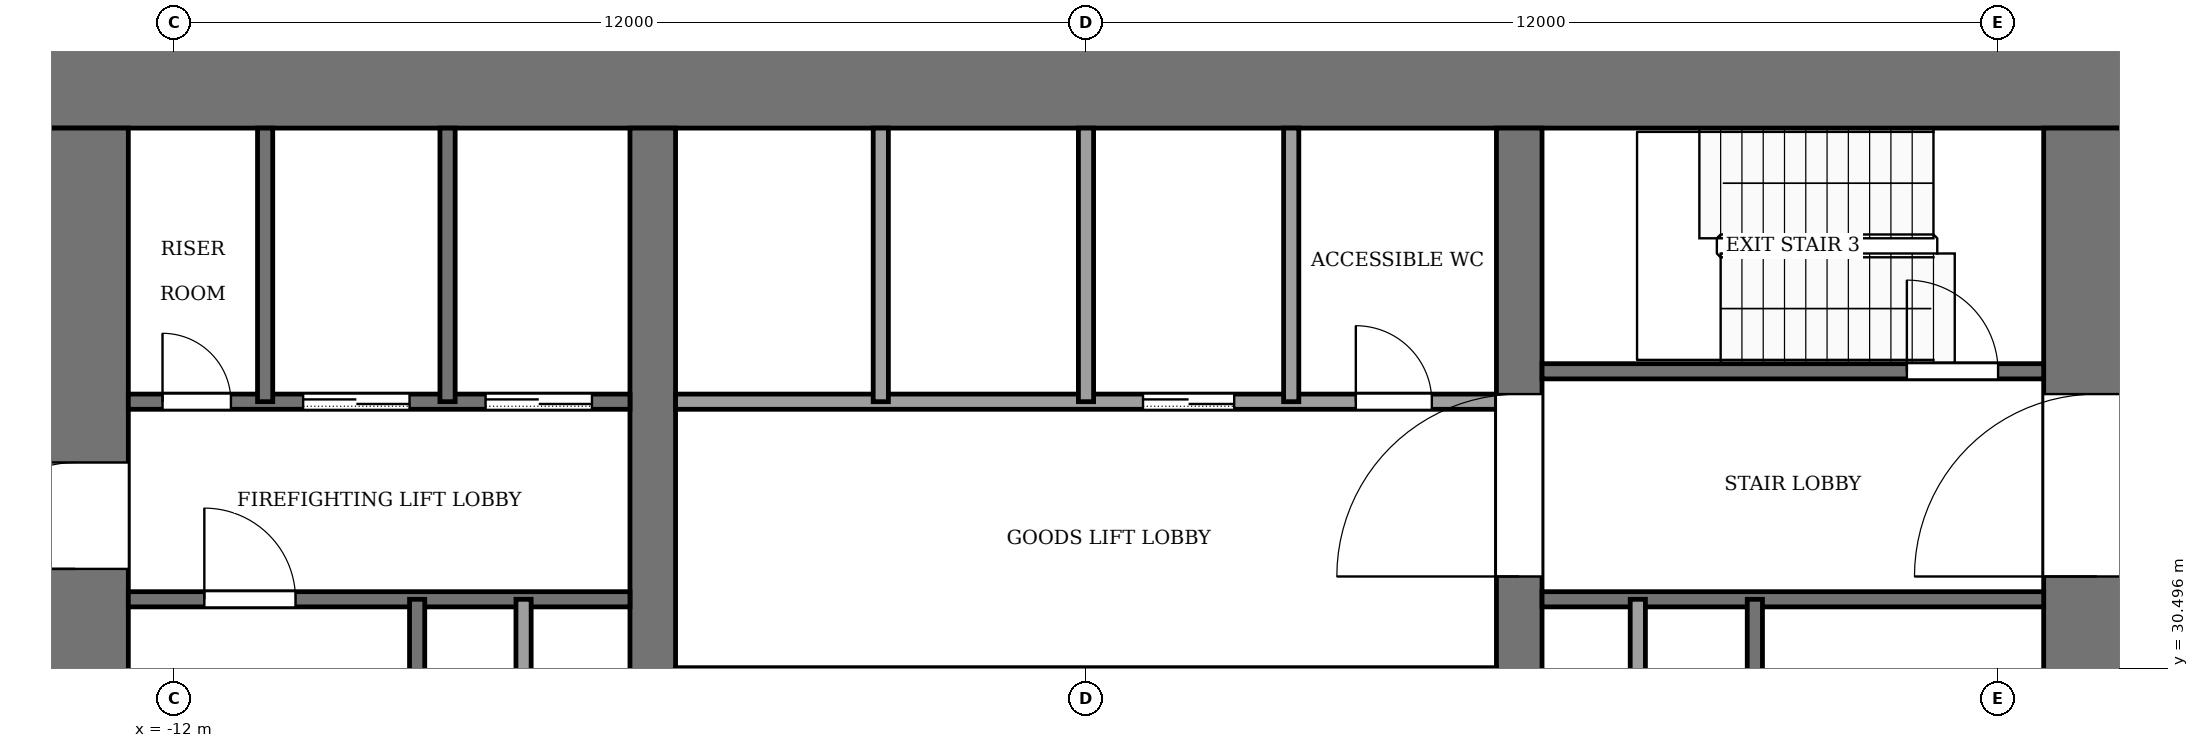
"""IFC4 building model, lengths in metres.
Left out: names, types, materials, properties, quantities, classifications, styles, units other than length and angle.
Written with IfcOpenShell. Run it as: python <this file> out.ifc"""

import sys

from ifc_helpers import new_model, si_unit, direction, frame, frame_2d, origin, place, context, subcontext, project, spatial, rectangle, extrude, element, fill, save


model = new_model("IFC4")
c1 = context("Model", 3, precision=1e-05, world=origin(), true_north=direction((0.0, 1.0)))
c2 = subcontext(c1, "Body", "Model", "MODEL_VIEW")
j1 = project(units=[si_unit("LENGTHUNIT", "METRE"), si_unit("PLANEANGLEUNIT", "RADIAN")], contexts=[c1])
p1 = place(None, origin())
s1 = spatial("IfcSite", under=j1, at=p1, CompositionType="ELEMENT")
p2 = place(p1, origin())
s2 = spatial("IfcBuilding", under=s1, at=p2, CompositionType="ELEMENT")
p3 = place(p2, frame((0.0, 0.0, 26.0)))
s3 = spatial("IfcBuildingStorey", under=s2, at=p3, CompositionType="ELEMENT", Elevation=26.0)
p4 = place(p3, frame((-14.0, 38.3, -0.13), z_axis=(0.0, 0.0, 1.0), x_axis=(1.0, 0.0, 0.0)))
e1 = element("IfcWall", 1, at=p4, inside=s3, PredefinedType="SHEAR", context=c2, shape_type="SweptSolid", body=[
    extrude(rectangle(XDim=28.0, YDim=1.4, at=frame_2d((14.0, 0.0))), origin(), (0.0, 0.0, 1.0), 4.0),
])
p5 = place(p3, frame((-13.3, 18.4, -0.13), z_axis=(0.0, 0.0, 1.0), x_axis=(0.0, 1.0, 0.0)))
e2 = element("IfcWall", 2, at=p5, inside=s3, PredefinedType="SHEAR", context=c2, shape_type="SweptSolid", body=[
    extrude(rectangle(XDim=19.2, YDim=1.4, at=frame_2d((9.6, 0.0))), origin(), (0.0, 0.0, 1.0), 4.0),
])
p6 = place(p5, frame((2.8, 0.0, 0.13)))
e3 = element("IfcOpeningElement", 3, at=p6, cuts=e2, PredefinedType="OPENING", context=c2, shape_type="SweptSolid", body=[
    extrude(rectangle(XDim=2.4, YDim=2.4, at=frame_2d((1.2, 1.2))), frame((0.0, 0.71, 0.0), z_axis=(0.0, -1.0, 0.0), x_axis=(1.0, 0.0, 0.0)), (0.0, 0.0, 1.0), 1.42),
])
p7 = place(p5, frame((13.4, 0.0, 0.13)))
e4 = element("IfcOpeningElement", 4, at=p7, cuts=e2, PredefinedType="OPENING", context=c2, shape_type="SweptSolid", body=[
    extrude(rectangle(XDim=1.4, YDim=2.2, at=frame_2d((0.7, 1.1))), frame((0.0, 0.71, 0.0), z_axis=(0.0, -1.0, 0.0), x_axis=(1.0, 0.0, 0.0)), (0.0, 0.0, 1.0), 1.42),
])
p8 = place(p3, frame((13.3, 18.4, -0.13), z_axis=(0.0, 0.0, 1.0), x_axis=(0.0, 1.0, 0.0)))
e5 = element("IfcWall", 5, at=p8, inside=s3, PredefinedType="SHEAR", context=c2, shape_type="SweptSolid", body=[
    extrude(rectangle(XDim=19.2, YDim=1.4, at=frame_2d((9.6, 0.0))), origin(), (0.0, 0.0, 1.0), 4.0),
])
p9 = place(p8, frame((2.8, 0.0, 0.13)))
e6 = element("IfcOpeningElement", 6, at=p9, cuts=e5, PredefinedType="OPENING", context=c2, shape_type="SweptSolid", body=[
    extrude(rectangle(XDim=2.4, YDim=2.4, at=frame_2d((1.2, 1.2))), frame((0.0, 0.71, 0.0), z_axis=(0.0, -1.0, 0.0), x_axis=(1.0, 0.0, 0.0)), (0.0, 0.0, 1.0), 1.42),
])
p10 = place(p8, frame((13.3, 0.0, 0.13)))
e7 = element("IfcOpeningElement", 7, at=p10, cuts=e5, PredefinedType="OPENING", context=c2, shape_type="SweptSolid", body=[
    extrude(rectangle(XDim=2.4, YDim=2.4, at=frame_2d((1.2, 1.2))), frame((0.0, 0.71, 0.0), z_axis=(0.0, -1.0, 0.0), x_axis=(1.0, 0.0, 0.0)), (0.0, 0.0, 1.0), 1.42),
])
p11 = place(p3, frame((-5.7, 18.4, -0.13), z_axis=(0.0, 0.0, 1.0), x_axis=(0.0, 1.0, 0.0)))
e8 = element("IfcWall", 8, at=p11, inside=s3, PredefinedType="SHEAR", context=c2, shape_type="SweptSolid", body=[
    extrude(rectangle(XDim=19.2, YDim=0.6, at=frame_2d((9.6, 0.0))), origin(), (0.0, 0.0, 1.0), 4.0),
])
p12 = place(p11, frame((8.35, 0.0, 0.13)))
e9 = element("IfcOpeningElement", 9, at=p12, cuts=e8, PredefinedType="OPENING", context=c2, shape_type="SweptSolid", body=[
    extrude(rectangle(XDim=0.9, YDim=2.1, at=frame_2d((0.45, 1.05))), frame((0.0, 0.31, 0.0), z_axis=(0.0, -1.0, 0.0), x_axis=(1.0, 0.0, 0.0)), (0.0, 0.0, 1.0), 0.62),
])
p13 = place(p3, frame((5.7, 18.4, -0.13), z_axis=(0.0, 0.0, 1.0), x_axis=(0.0, 1.0, 0.0)))
e10 = element("IfcWall", 10, at=p13, inside=s3, PredefinedType="SHEAR", context=c2, shape_type="SweptSolid", body=[
    extrude(rectangle(XDim=19.2, YDim=0.6, at=frame_2d((9.6, 0.0))), origin(), (0.0, 0.0, 1.0), 4.0),
])
p14 = place(p13, frame((13.3, 0.0, 0.13)))
e11 = element("IfcOpeningElement", 11, at=p14, cuts=e10, PredefinedType="OPENING", context=c2, shape_type="SweptSolid", body=[
    extrude(rectangle(XDim=2.4, YDim=2.4, at=frame_2d((1.2, 1.2))), frame((0.0, 0.31, 0.0), z_axis=(0.0, -1.0, 0.0), x_axis=(1.0, 0.0, 0.0)), (0.0, 0.0, 1.0), 0.62),
])
p15 = place(p3, frame((-12.6, 31.4, 0.0), z_axis=(0.0, 0.0, 1.0), x_axis=(1.0, 0.0, 0.0)))
e12 = element("IfcWall", 12, at=p15, inside=s3, PredefinedType="PARTITIONING", context=c2, shape_type="SweptSolid", body=[
    extrude(rectangle(XDim=6.6, YDim=0.2, at=frame_2d((3.3, 0.0))), origin(), (0.0, 0.0, 1.0), 3.87),
])
p16 = place(p15, frame((1.0, 0.0, 0.0)))
e13 = element("IfcOpeningElement", 13, at=p16, cuts=e12, PredefinedType="OPENING", context=c2, shape_type="SweptSolid", body=[
    extrude(rectangle(XDim=1.2, YDim=2.2, at=frame_2d((0.6, 1.1))), frame((0.0, 0.11, 0.0), z_axis=(0.0, -1.0, 0.0), x_axis=(1.0, 0.0, 0.0)), (0.0, 0.0, 1.0), 0.22),
])
p17 = place(p3, frame((6.0, 31.4, 0.0), z_axis=(0.0, 0.0, 1.0), x_axis=(1.0, 0.0, 0.0)))
e14 = element("IfcWall", 14, at=p17, inside=s3, PredefinedType="PARTITIONING", context=c2, shape_type="SweptSolid", body=[
    extrude(rectangle(XDim=6.6, YDim=0.2, at=frame_2d((3.3, 0.0))), origin(), (0.0, 0.0, 1.0), 3.87),
])
p18 = place(p3, frame((-12.6, 34.0, 0.0), z_axis=(0.0, 0.0, 1.0), x_axis=(1.0, 0.0, 0.0)))
e15 = element("IfcWall", 15, at=p18, inside=s3, PredefinedType="PARTITIONING", context=c2, shape_type="SweptSolid", body=[
    extrude(rectangle(XDim=6.6, YDim=0.2, at=frame_2d((3.3, 0.0))), origin(), (0.0, 0.0, 1.0), 3.87),
])
p19 = place(p18, frame((4.7, 0.0, 0.0)))
e16 = element("IfcOpeningElement", 16, at=p19, cuts=e15, PredefinedType="OPENING", context=c2, shape_type="SweptSolid", body=[
    extrude(rectangle(XDim=1.4, YDim=2.2, at=frame_2d((0.7, 1.1))), frame((0.0, 0.11, 0.0), z_axis=(0.0, -1.0, 0.0), x_axis=(1.0, 0.0, 0.0)), (0.0, 0.0, 1.0), 0.22),
])
p20 = place(p18, frame((2.3, 0.0, 0.0)))
e17 = element("IfcOpeningElement", 17, at=p20, cuts=e15, PredefinedType="OPENING", context=c2, shape_type="SweptSolid", body=[
    extrude(rectangle(XDim=1.4, YDim=2.2, at=frame_2d((0.7, 1.1))), frame((0.0, 0.11, 0.0), z_axis=(0.0, -1.0, 0.0), x_axis=(1.0, 0.0, 0.0)), (0.0, 0.0, 1.0), 0.22),
])
p21 = place(p18, frame((0.45, 0.0, 0.0)))
e18 = element("IfcOpeningElement", 18, at=p21, cuts=e15, PredefinedType="OPENING", context=c2, shape_type="SweptSolid", body=[
    extrude(rectangle(XDim=0.9, YDim=2.1, at=frame_2d((0.45, 1.05))), frame((0.0, 0.11, 0.0), z_axis=(0.0, -1.0, 0.0), x_axis=(1.0, 0.0, 0.0)), (0.0, 0.0, 1.0), 0.22),
])
p22 = place(p3, frame((-5.4, 34.0, 0.0), z_axis=(0.0, 0.0, 1.0), x_axis=(1.0, 0.0, 0.0)))
e19 = element("IfcWall", 19, at=p22, inside=s3, PredefinedType="PARTITIONING", context=c2, shape_type="SweptSolid", body=[
    extrude(rectangle(XDim=10.8, YDim=0.2, at=frame_2d((5.4, 0.0))), origin(), (0.0, 0.0, 1.0), 3.87),
])
p23 = place(p22, frame((6.15, 0.0, 0.0)))
e20 = element("IfcOpeningElement", 20, at=p23, cuts=e19, PredefinedType="OPENING", context=c2, shape_type="SweptSolid", body=[
    extrude(rectangle(XDim=1.2, YDim=2.2, at=frame_2d((0.6, 1.1))), frame((0.0, 0.11, 0.0), z_axis=(0.0, -1.0, 0.0), x_axis=(1.0, 0.0, 0.0)), (0.0, 0.0, 1.0), 0.22),
])
p24 = place(p22, frame((8.95, 0.0, 0.0)))
e21 = element("IfcOpeningElement", 21, at=p24, cuts=e19, PredefinedType="OPENING", context=c2, shape_type="SweptSolid", body=[
    extrude(rectangle(XDim=1.0, YDim=2.1, at=frame_2d((0.5, 1.05))), frame((0.0, 0.11, 0.0), z_axis=(0.0, -1.0, 0.0), x_axis=(1.0, 0.0, 0.0)), (0.0, 0.0, 1.0), 0.22),
])
p25 = place(p3, frame((6.0, 34.4, 0.0), z_axis=(0.0, 0.0, 1.0), x_axis=(1.0, 0.0, 0.0)))
e22 = element("IfcWall", 22, at=p25, inside=s3, PredefinedType="PARTITIONING", context=c2, shape_type="SweptSolid", body=[
    extrude(rectangle(XDim=6.6, YDim=0.2, at=frame_2d((3.3, 0.0))), origin(), (0.0, 0.0, 1.0), 3.87),
])
p26 = place(p25, frame((4.8, 0.0, 0.0)))
e23 = element("IfcOpeningElement", 23, at=p26, cuts=e22, PredefinedType="OPENING", context=c2, shape_type="SweptSolid", body=[
    extrude(rectangle(XDim=1.2, YDim=2.2, at=frame_2d((0.6, 1.1))), frame((0.0, 0.11, 0.0), z_axis=(0.0, -1.0, 0.0), x_axis=(1.0, 0.0, 0.0)), (0.0, 0.0, 1.0), 0.22),
])
p27 = place(p3, frame((-10.8, 34.0, 0.0), z_axis=(0.0, 0.0, 1.0), x_axis=(0.0, 1.0, 0.0)))
e24 = element("IfcWall", 24, at=p27, inside=s3, PredefinedType="PARTITIONING", context=c2, shape_type="SweptSolid", body=[
    extrude(rectangle(XDim=3.6, YDim=0.2, at=frame_2d((1.8, 0.0))), origin(), (0.0, 0.0, 1.0), 3.87),
])
p28 = place(p3, frame((-8.8, 24.0, 0.0), z_axis=(0.0, 0.0, 1.0), x_axis=(0.0, 1.0, 0.0)))
e25 = element("IfcWall", 25, at=p28, inside=s3, PredefinedType="PARTITIONING", context=c2, shape_type="SweptSolid", body=[
    extrude(rectangle(XDim=7.4, YDim=0.2, at=frame_2d((3.7, 0.0))), origin(), (0.0, 0.0, 1.0), 3.87),
])
p29 = place(p3, frame((-8.4, 34.0, 0.0), z_axis=(0.0, 0.0, 1.0), x_axis=(0.0, 1.0, 0.0)))
e26 = element("IfcWall", 26, at=p29, inside=s3, PredefinedType="PARTITIONING", context=c2, shape_type="SweptSolid", body=[
    extrude(rectangle(XDim=3.6, YDim=0.2, at=frame_2d((1.8, 0.0))), origin(), (0.0, 0.0, 1.0), 3.87),
])
p30 = place(p3, frame((-7.4, 24.0, 0.0), z_axis=(0.0, 0.0, 1.0), x_axis=(0.0, 1.0, 0.0)))
e27 = element("IfcWall", 27, at=p30, inside=s3, PredefinedType="PARTITIONING", context=c2, shape_type="SweptSolid", body=[
    extrude(rectangle(XDim=7.4, YDim=0.2, at=frame_2d((3.7, 0.0))), origin(), (0.0, 0.0, 1.0), 3.87),
])
for number, where, z_axis, x_axis in (
    (28, (-2.7, 34.0, 0.0), (0.0, 0.0, 1.0), (0.0, 1.0, 0.0)),
    (29, (0.0, 34.0, 0.0), (0.0, 0.0, 1.0), (0.0, 1.0, 0.0)),
    (30, (2.7, 34.0, 0.0), (0.0, 0.0, 1.0), (0.0, 1.0, 0.0)),
):
    element("IfcWall", number, at=place(p3, frame(where, z_axis=z_axis, x_axis=x_axis)), inside=s3, PredefinedType="PARTITIONING", context=c2, shape_type="SweptSolid", body=[
        extrude(rectangle(XDim=3.6, YDim=0.2, at=frame_2d((1.8, 0.0))), origin(), (0.0, 0.0, 1.0), 3.87),
    ])
for number, where, z_axis, x_axis in (
    (31, (7.26, 24.0, 0.0), (0.0, 0.0, 1.0), (0.0, 1.0, 0.0)),
    (32, (8.8, 24.0, 0.0), (0.0, 0.0, 1.0), (0.0, 1.0, 0.0)),
):
    element("IfcWall", number, at=place(p3, frame(where, z_axis=z_axis, x_axis=x_axis)), inside=s3, PredefinedType="PARTITIONING", context=c2, shape_type="SweptSolid", body=[
        extrude(rectangle(XDim=7.4, YDim=0.2, at=frame_2d((3.7, 0.0))), origin(), (0.0, 0.0, 1.0), 3.87),
    ])
p31 = place(p23, origin())
e33 = element("IfcDoor", 33, at=p31, inside=s3, OperationType="SLIDING_TO_LEFT", PredefinedType="DOOR", context=c2, shape_type="SweptSolid", body=[
    extrude(rectangle(XDim=1.2, YDim=2.2, at=frame_2d((0.6, 1.1))), frame((0.0, 0.025, 0.0), z_axis=(0.0, -1.0, 0.0), x_axis=(1.0, 0.0, 0.0)), (0.0, 0.0, 1.0), 0.05),
])
fill(e20, e33)
p32 = place(p19, origin())
e34 = element("IfcDoor", 34, at=p32, inside=s3, OperationType="SLIDING_TO_LEFT", PredefinedType="DOOR", context=c2, shape_type="SweptSolid", body=[
    extrude(rectangle(XDim=1.4, YDim=2.2, at=frame_2d((0.7, 1.1))), frame((0.0, 0.025, 0.0), z_axis=(0.0, -1.0, 0.0), x_axis=(1.0, 0.0, 0.0)), (0.0, 0.0, 1.0), 0.05),
])
fill(e16, e34)
p33 = place(p20, origin())
e35 = element("IfcDoor", 35, at=p33, inside=s3, OperationType="SLIDING_TO_LEFT", PredefinedType="DOOR", context=c2, shape_type="SweptSolid", body=[
    extrude(rectangle(XDim=1.4, YDim=2.2, at=frame_2d((0.7, 1.1))), frame((0.0, 0.025, 0.0), z_axis=(0.0, -1.0, 0.0), x_axis=(1.0, 0.0, 0.0)), (0.0, 0.0, 1.0), 0.05),
])
fill(e17, e35)
p34 = place(p21, origin())
e36 = element("IfcDoor", 36, at=p34, inside=s3, OperationType="SINGLE_SWING_RIGHT", PredefinedType="DOOR", context=c2, shape_type="SweptSolid", body=[
    extrude(rectangle(XDim=0.9, YDim=2.1, at=frame_2d((0.45, 1.05))), frame((0.0, 0.025, 0.0), z_axis=(0.0, -1.0, 0.0), x_axis=(1.0, 0.0, 0.0)), (0.0, 0.0, 1.0), 0.05),
])
fill(e18, e36)
p35 = place(p24, origin())
e37 = element("IfcDoor", 37, at=p35, inside=s3, OperationType="SINGLE_SWING_LEFT", PredefinedType="DOOR", context=c2, shape_type="SweptSolid", body=[
    extrude(rectangle(XDim=1.0, YDim=2.1, at=frame_2d((0.5, 1.05))), frame((0.0, 0.025, 0.0), z_axis=(0.0, -1.0, 0.0), x_axis=(1.0, 0.0, 0.0)), (0.0, 0.0, 1.0), 0.05),
])
fill(e21, e37)
p36 = place(p16, origin())
e38 = element("IfcDoor", 38, at=p36, inside=s3, OperationType="SINGLE_SWING_RIGHT", PredefinedType="DOOR", context=c2, shape_type="SweptSolid", body=[
    extrude(rectangle(XDim=1.2, YDim=2.2, at=frame_2d((0.6, 1.1))), frame((0.0, 0.025, 0.0), z_axis=(0.0, -1.0, 0.0), x_axis=(1.0, 0.0, 0.0)), (0.0, 0.0, 1.0), 0.05),
])
fill(e13, e38)
p37 = place(p26, origin())
e39 = element("IfcDoor", 39, at=p37, inside=s3, OperationType="SINGLE_SWING_RIGHT", PredefinedType="DOOR", context=c2, shape_type="SweptSolid", body=[
    extrude(rectangle(XDim=1.2, YDim=2.2, at=frame_2d((0.6, 1.1))), frame((0.0, 0.025, 0.0), z_axis=(0.0, -1.0, 0.0), x_axis=(1.0, 0.0, 0.0)), (0.0, 0.0, 1.0), 0.05),
])
fill(e23, e39)
p38 = place(p14, origin())
e40 = element("IfcDoor", 40, at=p38, inside=s3, OperationType="DOUBLE_DOOR_SINGLE_SWING", PredefinedType="DOOR", context=c2, shape_type="SweptSolid", body=[
    extrude(rectangle(XDim=2.4, YDim=2.4, at=frame_2d((1.2, 1.2))), frame((0.0, 0.025, 0.0), z_axis=(0.0, -1.0, 0.0), x_axis=(1.0, 0.0, 0.0)), (0.0, 0.0, 1.0), 0.05),
])
fill(e11, e40)
p39 = place(p10, origin())
e41 = element("IfcDoor", 41, at=p39, inside=s3, OperationType="DOUBLE_DOOR_SINGLE_SWING", PredefinedType="DOOR", context=c2, shape_type="SweptSolid", body=[
    extrude(rectangle(XDim=2.4, YDim=2.4, at=frame_2d((1.2, 1.2))), frame((0.0, 0.025, 0.0), z_axis=(0.0, -1.0, 0.0), x_axis=(1.0, 0.0, 0.0)), (0.0, 0.0, 1.0), 0.05),
])
fill(e7, e41)
p40 = place(p7, origin())
e42 = element("IfcDoor", 42, at=p40, inside=s3, OperationType="SINGLE_SWING_RIGHT", PredefinedType="DOOR", context=c2, shape_type="SweptSolid", body=[
    extrude(rectangle(XDim=1.4, YDim=2.2, at=frame_2d((0.7, 1.1))), frame((0.0, 0.025, 0.0), z_axis=(0.0, -1.0, 0.0), x_axis=(1.0, 0.0, 0.0)), (0.0, 0.0, 1.0), 0.05),
])
fill(e4, e42)
save(model, sys.argv[1])
